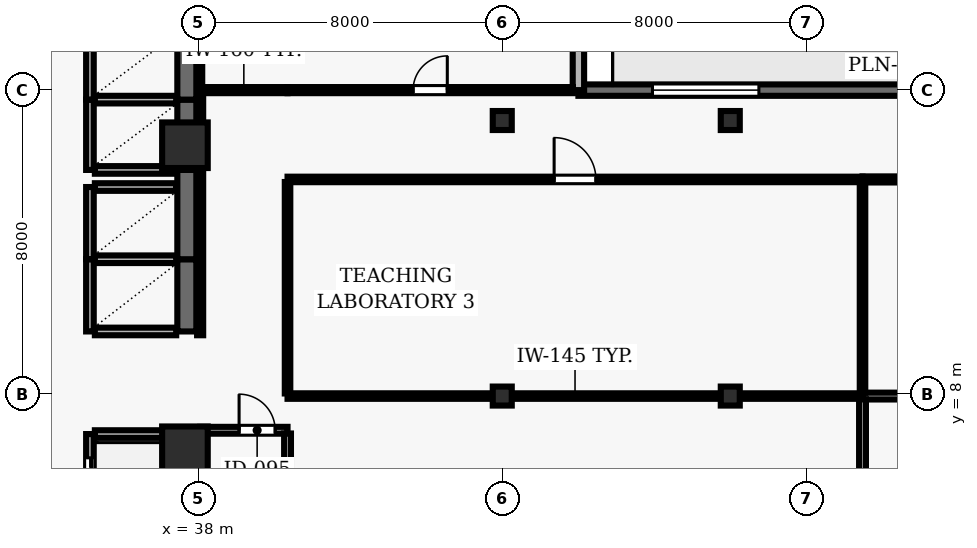
"""IFC4 building model, lengths in metres.
Left out: names, types, materials, properties, quantities, classifications, styles, units other than length and angle.
Written with IfcOpenShell. Run it as: python <this file> out.ifc"""

import sys

from ifc_helpers import new_model, si_unit, direction, frame, frame_2d, origin, origin_2d, place, context, subcontext, project, spatial, rectangle, hollow_rectangle, extrude, element, fill, save


model = new_model("IFC4")
c1 = context("Model", 3, precision=1e-05, world=origin(), true_north=direction((0.0, 1.0)))
c2 = subcontext(c1, "Body", "Model", "MODEL_VIEW")
j1 = project(units=[si_unit("LENGTHUNIT", "METRE"), si_unit("PLANEANGLEUNIT", "RADIAN")], contexts=[c1])
p1 = place(None, origin())
s1 = spatial("IfcSite", under=j1, at=p1, CompositionType="ELEMENT")
p2 = place(p1, origin())
s2 = spatial("IfcBuilding", under=s1, at=p2, CompositionType="ELEMENT")
p3 = place(p2, frame((0.0, 0.0, 119.0)))
s3 = spatial("IfcBuildingStorey", under=s2, at=p3, CompositionType="ELEMENT", Elevation=119.0)
for number, where, z_axis, x_axis in (
    (1, (37.65, 6.55, 0.0), (0.0, 0.0, 1.0), (1.0, 0.0, 0.0)),
    (2, (37.65, 14.55, 0.0), (0.0, 0.0, 1.0), (1.0, 0.0, 0.0)),
):
    element("IfcColumn", number, at=place(p3, frame(where, z_axis=z_axis, x_axis=x_axis)), inside=s3, PredefinedType="COLUMN", context=c2, shape_type="SweptSolid", body=[
        extrude(rectangle(XDim=1.2, YDim=1.2, at=origin_2d()), origin(), (0.0, 0.0, 1.0), 3.9),
    ])
for number, where, z_axis, x_axis in (
    (3, (46.0, 7.95, 0.0), (0.0, 0.0, 1.0), (1.0, 0.0, 0.0)),
    (4, (46.0, 15.2, 0.0), (0.0, 0.0, 1.0), (1.0, 0.0, 0.0)),
    (5, (52.0, 7.95, 0.0), (0.0, 0.0, 1.0), (1.0, 0.0, 0.0)),
    (6, (52.0, 15.2, 0.0), (0.0, 0.0, 1.0), (1.0, 0.0, 0.0)),
):
    element("IfcColumn", number, at=place(p3, frame(where, z_axis=z_axis, x_axis=x_axis)), inside=s3, PredefinedType="COLUMN", context=c2, shape_type="SweptSolid", body=[
        extrude(hollow_rectangle(XDim=0.5, YDim=0.5, WallThickness=0.025, at=origin_2d()), origin(), (0.0, 0.0, 1.0), 3.9),
    ])
p4 = place(p3, frame((68.1, 16.0, 0.0), z_axis=(0.0, 0.0, 1.0), x_axis=(-1.0, 0.0, 0.0)))
e7 = element("IfcWall", 7, at=p4, inside=s3, PredefinedType="SOLIDWALL", context=c2, shape_type="SweptSolid", body=[
    extrude(rectangle(XDim=20.096, YDim=0.3, at=frame_2d((10.048, 0.0))), origin(), (0.0, 0.0, 1.0), 3.69),
])
p5 = place(p4, frame((7.248, 0.0, 0.0)))
e8 = element("IfcOpeningElement", 8, at=p5, cuts=e7, PredefinedType="OPENING", context=c2, shape_type="SweptSolid", body=[
    extrude(rectangle(XDim=1.0, YDim=2.2, at=frame_2d((0.5, 1.1))), frame((0.0, 0.16, 0.0), z_axis=(0.0, -1.0, 0.0), x_axis=(1.0, 0.0, 0.0)), (0.0, 0.0, 1.0), 0.32),
])
p6 = place(p4, frame((1.949, 0.0, 0.9)))
e9 = element("IfcOpeningElement", 9, at=p6, cuts=e7, PredefinedType="OPENING", context=c2, shape_type="SweptSolid", body=[
    extrude(rectangle(XDim=2.8, YDim=1.8, at=frame_2d((1.4, 0.9))), frame((0.0, 0.16, 0.0), z_axis=(0.0, -1.0, 0.0), x_axis=(1.0, 0.0, 0.0)), (0.0, 0.0, 1.0), 0.32),
])
p7 = place(p4, frame((8.648, 0.0, 0.9)))
e10 = element("IfcOpeningElement", 10, at=p7, cuts=e7, PredefinedType="OPENING", context=c2, shape_type="SweptSolid", body=[
    extrude(rectangle(XDim=2.8, YDim=1.8, at=frame_2d((1.4, 0.9))), frame((0.0, 0.16, 0.0), z_axis=(0.0, -1.0, 0.0), x_axis=(1.0, 0.0, 0.0)), (0.0, 0.0, 1.0), 0.32),
])
p8 = place(p4, frame((15.347, 0.0, 0.9)))
e11 = element("IfcOpeningElement", 11, at=p8, cuts=e7, PredefinedType="OPENING", context=c2, shape_type="SweptSolid", body=[
    extrude(rectangle(XDim=2.8, YDim=1.8, at=frame_2d((1.4, 0.9))), frame((0.0, 0.16, 0.0), z_axis=(0.0, -1.0, 0.0), x_axis=(1.0, 0.0, 0.0)), (0.0, 0.0, 1.0), 0.32),
])
p9 = place(p3, frame((48.004, 16.0, 0.0), z_axis=(0.0, 0.0, 1.0), x_axis=(0.0, 1.0, 0.0)))
e12 = element("IfcWall", 12, at=p9, inside=s3, PredefinedType="SOLIDWALL", context=c2, shape_type="SweptSolid", body=[
    extrude(rectangle(XDim=12.15, YDim=0.3, at=frame_2d((6.075, 0.0))), origin(), (0.0, 0.0, 1.0), 3.69),
])
p10 = place(p9, frame((2.137, 0.0, 0.9)))
e13 = element("IfcOpeningElement", 13, at=p10, cuts=e12, PredefinedType="OPENING", context=c2, shape_type="SweptSolid", body=[
    extrude(rectangle(XDim=1.8, YDim=2.2, at=frame_2d((0.9, 1.1))), frame((0.0, 0.16, 0.0), z_axis=(0.0, -1.0, 0.0), x_axis=(1.0, 0.0, 0.0)), (0.0, 0.0, 1.0), 0.32),
])
p11 = place(p9, frame((8.212, 0.0, 0.9)))
e14 = element("IfcOpeningElement", 14, at=p11, cuts=e12, PredefinedType="OPENING", context=c2, shape_type="SweptSolid", body=[
    extrude(rectangle(XDim=1.8, YDim=2.2, at=frame_2d((0.9, 1.1))), frame((0.0, 0.16, 0.0), z_axis=(0.0, -1.0, 0.0), x_axis=(1.0, 0.0, 0.0)), (0.0, 0.0, 1.0), 0.32),
])
p12 = place(p3, frame((35.15, 6.95, 0.0), z_axis=(0.0, 0.0, 1.0), x_axis=(0.0, -1.0, 0.0)))
e15 = element("IfcWall", 15, at=p12, inside=s3, PredefinedType="SOLIDWALL", context=c2, shape_type="SweptSolid", body=[
    extrude(rectangle(XDim=2.25, YDim=0.2, at=frame_2d((1.125, 0.0))), origin(), (0.0, 0.0, 1.0), 3.69),
])
p13 = place(p12, frame((0.625, 0.0, 0.0)))
e16 = element("IfcOpeningElement", 16, at=p13, cuts=e15, PredefinedType="OPENING", context=c2, shape_type="SweptSolid", body=[
    extrude(rectangle(XDim=1.0, YDim=2.1, at=frame_2d((0.5, 1.05))), frame((0.0, 0.11, 0.0), z_axis=(0.0, -1.0, 0.0), x_axis=(1.0, 0.0, 0.0)), (0.0, 0.0, 1.0), 0.22),
])
p14 = place(p3, frame((37.7, 4.7, 0.0), z_axis=(0.0, 0.0, 1.0), x_axis=(0.0, 1.0, 0.0)))
e17 = element("IfcWall", 17, at=p14, inside=s3, PredefinedType="SHEAR", context=c2, shape_type="SweptSolid", body=[
    extrude(rectangle(XDim=2.25, YDim=0.5, at=frame_2d((1.125, 0.0))), origin(), (0.0, 0.0, 1.0), 3.69),
])
p15 = place(p3, frame((37.42, 6.95, 0.0), z_axis=(0.0, 0.0, 1.0), x_axis=(-1.0, 0.0, 0.0)))
e18 = element("IfcWall", 18, at=p15, inside=s3, PredefinedType="SOLIDWALL", context=c2, shape_type="SweptSolid", body=[
    extrude(rectangle(XDim=2.14, YDim=0.2, at=frame_2d((1.07, 0.0))), origin(), (0.0, 0.0, 1.0), 3.69),
])
p16 = place(p3, frame((35.15, 11.55, 0.0), z_axis=(0.0, 0.0, 1.0), x_axis=(0.0, -1.0, 0.0)))
e19 = element("IfcWall", 19, at=p16, inside=s3, PredefinedType="SOLIDWALL", context=c2, shape_type="SweptSolid", body=[
    extrude(rectangle(XDim=1.9, YDim=0.2, at=frame_2d((0.95, 0.0))), origin(), (0.0, 0.0, 1.0), 3.69),
])
p17 = place(p3, frame((37.7, 9.65, 0.0), z_axis=(0.0, 0.0, 1.0), x_axis=(0.0, 1.0, 0.0)))
e20 = element("IfcWall", 20, at=p17, inside=s3, PredefinedType="SHEAR", context=c2, shape_type="SweptSolid", body=[
    extrude(rectangle(XDim=1.9, YDim=0.5, at=frame_2d((0.95, 0.0))), origin(), (0.0, 0.0, 1.0), 3.69),
])
for number, where, z_axis, x_axis in (
    (21, (35.28, 9.65, 0.0), (0.0, 0.0, 1.0), (1.0, 0.0, 0.0)),
    (22, (37.42, 11.55, 0.0), (0.0, 0.0, 1.0), (-1.0, 0.0, 0.0)),
):
    element("IfcWall", number, at=place(p3, frame(where, z_axis=z_axis, x_axis=x_axis)), inside=s3, PredefinedType="SOLIDWALL", context=c2, shape_type="SweptSolid", body=[
        extrude(rectangle(XDim=2.14, YDim=0.2, at=frame_2d((1.07, 0.0))), origin(), (0.0, 0.0, 1.0), 3.69),
    ])
p18 = place(p3, frame((35.15, 13.45, 0.0), z_axis=(0.0, 0.0, 1.0), x_axis=(0.0, -1.0, 0.0)))
e23 = element("IfcWall", 23, at=p18, inside=s3, PredefinedType="SOLIDWALL", context=c2, shape_type="SweptSolid", body=[
    extrude(rectangle(XDim=1.9, YDim=0.2, at=frame_2d((0.95, 0.0))), origin(), (0.0, 0.0, 1.0), 3.69),
])
p19 = place(p3, frame((37.7, 11.55, 0.0), z_axis=(0.0, 0.0, 1.0), x_axis=(0.0, 1.0, 0.0)))
e24 = element("IfcWall", 24, at=p19, inside=s3, PredefinedType="SHEAR", context=c2, shape_type="SweptSolid", body=[
    extrude(rectangle(XDim=2.35, YDim=0.5, at=frame_2d((1.175, 0.0))), origin(), (0.0, 0.0, 1.0), 3.69),
])
p20 = place(p3, frame((37.42, 13.45, 0.0), z_axis=(0.0, 0.0, 1.0), x_axis=(-1.0, 0.0, 0.0)))
e25 = element("IfcWall", 25, at=p20, inside=s3, PredefinedType="SOLIDWALL", context=c2, shape_type="SweptSolid", body=[
    extrude(rectangle(XDim=2.14, YDim=0.2, at=frame_2d((1.07, 0.0))), origin(), (0.0, 0.0, 1.0), 3.69),
])
p21 = place(p3, frame((35.15, 15.75, 0.0), z_axis=(0.0, 0.0, 1.0), x_axis=(0.0, -1.0, 0.0)))
e26 = element("IfcWall", 26, at=p21, inside=s3, PredefinedType="SOLIDWALL", context=c2, shape_type="SweptSolid", body=[
    extrude(rectangle(XDim=1.85, YDim=0.2, at=frame_2d((0.925, 0.0))), origin(), (0.0, 0.0, 1.0), 3.69),
])
p22 = place(p3, frame((37.7, 13.9, 0.0), z_axis=(0.0, 0.0, 1.0), x_axis=(0.0, 1.0, 0.0)))
e27 = element("IfcWall", 27, at=p22, inside=s3, PredefinedType="SHEAR", context=c2, shape_type="SweptSolid", body=[
    extrude(rectangle(XDim=1.85, YDim=0.5, at=frame_2d((0.925, 0.0))), origin(), (0.0, 0.0, 1.0), 3.69),
])
for number, where, z_axis, x_axis in (
    (28, (35.28, 13.9, 0.0), (0.0, 0.0, 1.0), (1.0, 0.0, 0.0)),
    (29, (37.42, 15.75, 0.0), (0.0, 0.0, 1.0), (-1.0, 0.0, 0.0)),
):
    element("IfcWall", number, at=place(p3, frame(where, z_axis=z_axis, x_axis=x_axis)), inside=s3, PredefinedType="SOLIDWALL", context=c2, shape_type="SweptSolid", body=[
        extrude(rectangle(XDim=2.14, YDim=0.2, at=frame_2d((1.07, 0.0))), origin(), (0.0, 0.0, 1.0), 3.69),
    ])
p23 = place(p3, frame((35.15, 17.6, 0.0), z_axis=(0.0, 0.0, 1.0), x_axis=(0.0, -1.0, 0.0)))
e30 = element("IfcWall", 30, at=p23, inside=s3, PredefinedType="SOLIDWALL", context=c2, shape_type="SweptSolid", body=[
    extrude(rectangle(XDim=1.85, YDim=0.2, at=frame_2d((0.925, 0.0))), origin(), (0.0, 0.0, 1.0), 3.69),
])
p24 = place(p3, frame((37.7, 15.75, 0.0), z_axis=(0.0, 0.0, 1.0), x_axis=(0.0, 1.0, 0.0)))
e31 = element("IfcWall", 31, at=p24, inside=s3, PredefinedType="SHEAR", context=c2, shape_type="SweptSolid", body=[
    extrude(rectangle(XDim=1.85, YDim=0.5, at=frame_2d((0.925, 0.0))), origin(), (0.0, 0.0, 1.0), 3.69),
])
p25 = place(p3, frame((38.05, 7.05, 0.0), z_axis=(0.0, 0.0, 1.0), x_axis=(1.0, 0.0, 0.0)))
e32 = element("IfcWall", 32, at=p25, inside=s3, PredefinedType="PARTITIONING", context=c2, shape_type="SweptSolid", body=[
    extrude(rectangle(XDim=2.3, YDim=0.18, at=frame_2d((1.15, 0.0))), origin(), (0.0, 0.0, 1.0), 3.69),
])
p26 = place(p25, frame((1.025, 0.0, 0.0)))
e33 = element("IfcOpeningElement", 33, at=p26, cuts=e32, PredefinedType="OPENING", context=c2, shape_type="SweptSolid", body=[
    extrude(rectangle(XDim=0.95, YDim=2.1, at=frame_2d((0.475, 1.05))), frame((0.0, 0.1, 0.0), z_axis=(0.0, -1.0, 0.0), x_axis=(1.0, 0.0, 0.0)), (0.0, 0.0, 1.0), 0.2),
])
p27 = place(p3, frame((40.35, 13.65, 0.0), z_axis=(0.0, 0.0, 1.0), x_axis=(1.0, 0.0, 0.0)))
e34 = element("IfcWall", 34, at=p27, inside=s3, PredefinedType="PARTITIONING", context=c2, shape_type="SweptSolid", body=[
    extrude(rectangle(XDim=15.13, YDim=0.145, at=frame_2d((7.565, 0.0))), origin(), (0.0, 0.0, 1.0), 3.69),
])
p28 = place(p27, frame((7.015, 0.0, 0.0)))
e35 = element("IfcOpeningElement", 35, at=p28, cuts=e34, PredefinedType="OPENING", context=c2, shape_type="SweptSolid", body=[
    extrude(rectangle(XDim=1.1, YDim=2.15, at=frame_2d((0.55, 1.075))), frame((0.0, 0.083, 0.0), z_axis=(0.0, -1.0, 0.0), x_axis=(1.0, 0.0, 0.0)), (0.0, 0.0, 1.0), 0.165),
])
p29 = place(p3, frame((40.35, 16.0, 0.0), z_axis=(0.0, 0.0, 1.0), x_axis=(-1.0, 0.0, 0.0)))
e36 = element("IfcWall", 36, at=p29, inside=s3, PredefinedType="PARTITIONING", context=c2, shape_type="SweptSolid", body=[
    extrude(rectangle(XDim=2.3, YDim=0.16, at=frame_2d((1.15, 0.0))), origin(), (0.0, 0.0, 1.0), 3.69),
])
p30 = place(p3, frame((40.35, 16.0, 0.0), z_axis=(0.0, 0.0, 1.0), x_axis=(1.0, 0.0, 0.0)))
e37 = element("IfcWall", 37, at=p30, inside=s3, PredefinedType="PARTITIONING", context=c2, shape_type="SweptSolid", body=[
    extrude(rectangle(XDim=7.509, YDim=0.16, at=frame_2d((3.754, 0.0))), origin(), (0.0, 0.0, 1.0), 3.39),
])
p31 = place(p30, frame((3.304, 0.0, 0.0)))
e38 = element("IfcOpeningElement", 38, at=p31, cuts=e37, PredefinedType="OPENING", context=c2, shape_type="SweptSolid", body=[
    extrude(rectangle(XDim=0.9, YDim=2.1, at=frame_2d((0.45, 1.05))), frame((0.0, 0.09, 0.0), z_axis=(0.0, -1.0, 0.0), x_axis=(1.0, 0.0, 0.0)), (0.0, 0.0, 1.0), 0.18),
])
p32 = place(p3, frame((55.48, 7.95, 0.0), z_axis=(0.0, 0.0, 1.0), x_axis=(-1.0, 0.0, 0.0)))
e39 = element("IfcWall", 39, at=p32, inside=s3, PredefinedType="PARTITIONING", context=c2, shape_type="SweptSolid", body=[
    extrude(rectangle(XDim=15.13, YDim=0.145, at=frame_2d((7.565, 0.0))), origin(), (0.0, 0.0, 1.0), 3.074),
])
p33 = place(p3, frame((55.48, 13.65, 0.0), z_axis=(0.0, 0.0, 1.0), x_axis=(1.0, 0.0, 0.0)))
e40 = element("IfcWall", 40, at=p33, inside=s3, PredefinedType="PARTITIONING", context=c2, shape_type="SweptSolid", body=[
    extrude(rectangle(XDim=14.765, YDim=0.16, at=frame_2d((7.383, 0.0))), origin(), (0.0, 0.0, 1.0), 3.69),
])
p34 = place(p33, frame((5.883, 0.0, 0.0)))
e41 = element("IfcOpeningElement", 41, at=p34, cuts=e40, PredefinedType="OPENING", context=c2, shape_type="SweptSolid", body=[
    extrude(rectangle(XDim=0.9, YDim=2.1, at=frame_2d((0.45, 1.05))), frame((0.0, 0.09, 0.0), z_axis=(0.0, -1.0, 0.0), x_axis=(1.0, 0.0, 0.0)), (0.0, 0.0, 1.0), 0.18),
])
p35 = place(p3, frame((70.455, 7.95, 0.0), z_axis=(0.0, 0.0, 1.0), x_axis=(-1.0, 0.0, 0.0)))
e42 = element("IfcWall", 42, at=p35, inside=s3, PredefinedType="PARTITIONING", context=c2, shape_type="SweptSolid", body=[
    extrude(rectangle(XDim=14.975, YDim=0.18, at=frame_2d((7.488, 0.0))), origin(), (0.0, 0.0, 1.0), 3.074),
])
p36 = place(p3, frame((38.05, 6.965, 0.0), z_axis=(0.0, 0.0, 1.0), x_axis=(0.0, -1.0, 0.0)))
e43 = element("IfcWall", 43, at=p36, inside=s3, PredefinedType="PARTITIONING", context=c2, shape_type="SweptSolid", body=[
    extrude(rectangle(XDim=6.82, YDim=0.18, at=frame_2d((3.41, 0.0))), origin(), (0.0, 0.0, 1.0), 3.074),
])
p37 = place(p3, frame((38.05, 15.925, 0.0), z_axis=(0.0, 0.0, 1.0), x_axis=(0.0, -1.0, 0.0)))
e44 = element("IfcWall", 44, at=p37, inside=s3, PredefinedType="PARTITIONING", context=c2, shape_type="SweptSolid", body=[
    extrude(rectangle(XDim=6.375, YDim=0.16, at=frame_2d((3.188, 0.0))), origin(), (0.0, 0.0, 1.0), 3.074),
])
p38 = place(p3, frame((38.05, 23.85, 0.0), z_axis=(0.0, 0.0, 1.0), x_axis=(0.0, -1.0, 0.0)))
e45 = element("IfcWall", 45, at=p38, inside=s3, PredefinedType="MOVABLE", context=c2, shape_type="SweptSolid", body=[
    extrude(rectangle(XDim=7.775, YDim=0.11, at=frame_2d((3.888, 0.0))), origin(), (0.0, 0.0, 1.0), 3.074),
])
p39 = place(p3, frame((40.35, 0.09, 0.0), z_axis=(0.0, 0.0, 1.0), x_axis=(0.0, 1.0, 0.0)))
e46 = element("IfcWall", 46, at=p39, inside=s3, PredefinedType="PARTITIONING", context=c2, shape_type="SweptSolid", body=[
    extrude(rectangle(XDim=6.875, YDim=0.18, at=frame_2d((3.438, 0.0))), origin(), (0.0, 0.0, 1.0), 3.69),
])
p40 = place(p39, frame((2.888, 0.0, 0.0)))
e47 = element("IfcOpeningElement", 47, at=p40, cuts=e46, PredefinedType="OPENING", context=c2, shape_type="SweptSolid", body=[
    extrude(rectangle(XDim=1.1, YDim=2.15, at=frame_2d((0.55, 1.075))), frame((0.0, 0.1, 0.0), z_axis=(0.0, -1.0, 0.0), x_axis=(1.0, 0.0, 0.0)), (0.0, 0.0, 1.0), 0.2),
])
p41 = place(p3, frame((40.35, 8.018, 0.0), z_axis=(0.0, 0.0, 1.0), x_axis=(0.0, 1.0, 0.0)))
e48 = element("IfcWall", 48, at=p41, inside=s3, PredefinedType="PARTITIONING", context=c2, shape_type="SweptSolid", body=[
    extrude(rectangle(XDim=5.564, YDim=0.145, at=frame_2d((2.782, 0.0))), origin(), (0.0, 0.0, 1.0), 3.69),
])
p42 = place(p3, frame((55.48, 0.09, 0.0), z_axis=(0.0, 0.0, 1.0), x_axis=(0.0, 1.0, 0.0)))
e49 = element("IfcWall", 49, at=p42, inside=s3, PredefinedType="PARTITIONING", context=c2, shape_type="SweptSolid", body=[
    extrude(rectangle(XDim=7.775, YDim=0.18, at=frame_2d((3.887, 0.0))), origin(), (0.0, 0.0, 1.0), 3.69),
])
p43 = place(p42, frame((3.413, 0.0, 0.0)))
e50 = element("IfcOpeningElement", 50, at=p43, cuts=e49, PredefinedType="OPENING", context=c2, shape_type="SweptSolid", body=[
    extrude(rectangle(XDim=0.95, YDim=2.1, at=frame_2d((0.475, 1.05))), frame((0.0, 0.1, 0.0), z_axis=(0.0, -1.0, 0.0), x_axis=(1.0, 0.0, 0.0)), (0.0, 0.0, 1.0), 0.2),
])
p44 = place(p3, frame((55.48, 8.035, 0.0), z_axis=(0.0, 0.0, 1.0), x_axis=(0.0, 1.0, 0.0)))
e51 = element("IfcWall", 51, at=p44, inside=s3, PredefinedType="PARTITIONING", context=c2, shape_type="SweptSolid", body=[
    extrude(rectangle(XDim=5.54, YDim=0.145, at=frame_2d((2.77, 0.0))), origin(), (0.0, 0.0, 1.0), 3.69),
])
p45 = place(p8, origin())
e52 = element("IfcWindow", 52, at=p45, inside=s3, PartitioningType="SINGLE_PANEL", PredefinedType="WINDOW", context=c2, shape_type="SweptSolid", body=[
    extrude(rectangle(XDim=2.8, YDim=1.8, at=frame_2d((1.4, 0.9))), frame((0.0, 0.03, 0.0), z_axis=(0.0, -1.0, 0.0), x_axis=(1.0, 0.0, 0.0)), (0.0, 0.0, 1.0), 0.06),
])
fill(e11, e52)
p46 = place(p13, origin())
e53 = element("IfcDoor", 53, at=p46, inside=s3, OperationType="DOUBLE_DOOR_SLIDING", PredefinedType="DOOR", context=c2, shape_type="SweptSolid", body=[
    extrude(rectangle(XDim=1.0, YDim=2.1, at=frame_2d((0.5, 1.05))), frame((0.0, 0.025, 0.0), z_axis=(0.0, -1.0, 0.0), x_axis=(1.0, 0.0, 0.0)), (0.0, 0.0, 1.0), 0.05),
])
fill(e16, e53)
p47 = place(p26, origin())
e54 = element("IfcDoor", 54, at=p47, inside=s3, OperationType="SINGLE_SWING_LEFT", PredefinedType="DOOR", context=c2, shape_type="SweptSolid", body=[
    extrude(rectangle(XDim=0.95, YDim=2.1, at=frame_2d((0.475, 1.05))), frame((0.0, 0.025, 0.0), z_axis=(0.0, -1.0, 0.0), x_axis=(1.0, 0.0, 0.0)), (0.0, 0.0, 1.0), 0.05),
])
fill(e33, e54)
p48 = place(p28, origin())
e55 = element("IfcDoor", 55, at=p48, inside=s3, OperationType="SINGLE_SWING_LEFT", PredefinedType="DOOR", context=c2, shape_type="SweptSolid", body=[
    extrude(rectangle(XDim=1.1, YDim=2.15, at=frame_2d((0.55, 1.075))), frame((0.0, 0.025, 0.0), z_axis=(0.0, -1.0, 0.0), x_axis=(1.0, 0.0, 0.0)), (0.0, 0.0, 1.0), 0.05),
])
fill(e35, e55)
p49 = place(p31, origin())
e56 = element("IfcDoor", 56, at=p49, inside=s3, OperationType="SINGLE_SWING_RIGHT", PredefinedType="DOOR", context=c2, shape_type="SweptSolid", body=[
    extrude(rectangle(XDim=0.9, YDim=2.1, at=frame_2d((0.45, 1.05))), frame((0.0, 0.025, 0.0), z_axis=(0.0, -1.0, 0.0), x_axis=(1.0, 0.0, 0.0)), (0.0, 0.0, 1.0), 0.05),
])
fill(e38, e56)
save(model, sys.argv[1])
